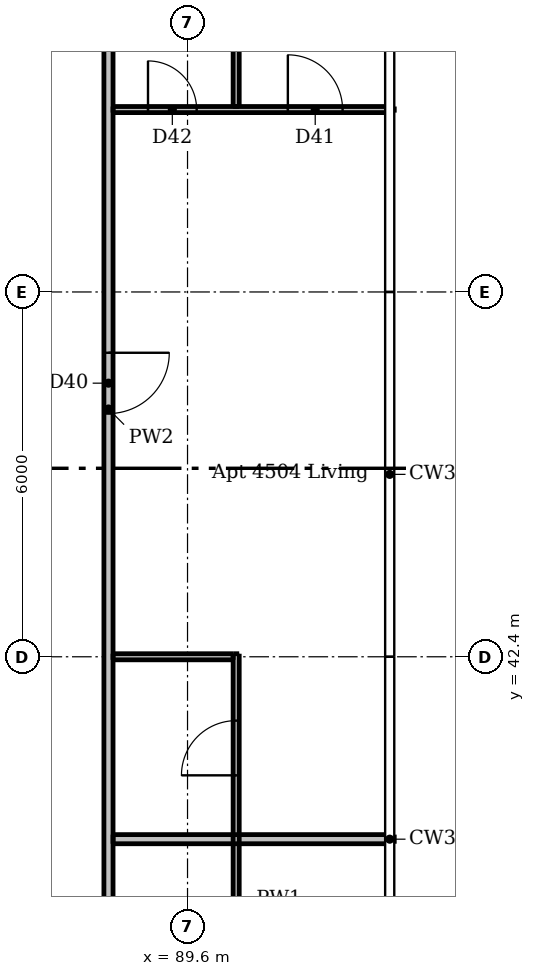
"""IFC4 building model, lengths in metres.
Left out: names, types, materials, properties, quantities, classifications, styles, units other than length and angle.
Written with IfcOpenShell. Run it as: python <this file> out.ifc"""

import sys

from ifc_helpers import new_model, si_unit, direction, frame, frame_2d, origin, place, context, subcontext, project, spatial, rectangle, extrude, element, fill, save


model = new_model("IFC4")
c1 = context("Model", 3, precision=1e-05, world=origin(), true_north=direction((0.0, 1.0)))
c2 = subcontext(c1, "Body", "Model", "MODEL_VIEW")
j1 = project(units=[si_unit("LENGTHUNIT", "METRE"), si_unit("PLANEANGLEUNIT", "RADIAN")], contexts=[c1])
p1 = place(None, origin())
s1 = spatial("IfcSite", under=j1, at=p1, CompositionType="ELEMENT")
p2 = place(p1, origin())
s2 = spatial("IfcBuilding", under=s1, at=p2, CompositionType="ELEMENT")
p3 = place(p2, frame((0.0, 0.0, 168.1)))
s3 = spatial("IfcBuildingStorey", under=s2, at=p3, CompositionType="ELEMENT", Elevation=168.1)
p4 = place(p3, frame((90.4, 33.45, 0.0), z_axis=(0.0, 0.0, 1.0), x_axis=(0.0, 1.0, 0.0)))
e1 = element("IfcWall", 1, at=p4, inside=s3, PredefinedType="PARTITIONING", context=c2, shape_type="SweptSolid", body=[
    extrude(rectangle(XDim=9.0, YDim=0.1, at=frame_2d((4.5, 0.0))), origin(), (0.0, 0.0, 1.0), 3.05),
])
p5 = place(p4, frame((3.75, 0.0, 0.0)))
e2 = element("IfcOpeningElement", 2, at=p5, cuts=e1, PredefinedType="OPENING", context=c2, shape_type="SweptSolid", body=[
    extrude(rectangle(XDim=0.8, YDim=2.1, at=frame_2d((0.4, 1.05))), frame((0.0, 0.06, 0.0), z_axis=(0.0, -1.0, 0.0), x_axis=(1.0, 0.0, 0.0)), (0.0, 0.0, 1.0), 0.12),
])
p6 = place(p4, frame((7.0, 0.0, 0.0)))
e3 = element("IfcOpeningElement", 3, at=p6, cuts=e1, PredefinedType="OPENING", context=c2, shape_type="SweptSolid", body=[
    extrude(rectangle(XDim=0.9, YDim=2.1, at=frame_2d((0.45, 1.05))), frame((0.0, 0.06, 0.0), z_axis=(0.0, -1.0, 0.0), x_axis=(1.0, 0.0, 0.0)), (0.0, 0.0, 1.0), 0.12),
])
p7 = place(p3, frame((90.4, 51.45, 0.0), z_axis=(0.0, 0.0, 1.0), x_axis=(0.0, 1.0, 0.0)))
e4 = element("IfcWall", 4, at=p7, inside=s3, PredefinedType="PARTITIONING", context=c2, shape_type="SweptSolid", body=[
    extrude(rectangle(XDim=5.1, YDim=0.1, at=frame_2d((2.55, 0.0))), origin(), (0.0, 0.0, 1.0), 3.05),
])
p8 = place(p7, frame((3.55, 0.0, 0.0)))
e5 = element("IfcOpeningElement", 5, at=p8, cuts=e4, PredefinedType="OPENING", context=c2, shape_type="SweptSolid", body=[
    extrude(rectangle(XDim=0.9, YDim=2.1, at=frame_2d((0.45, 1.05))), frame((0.0, 0.06, 0.0), z_axis=(0.0, -1.0, 0.0), x_axis=(1.0, 0.0, 0.0)), (0.0, 0.0, 1.0), 0.12),
])
p9 = place(p3, frame((88.375, 51.4, 0.0), z_axis=(0.0, 0.0, 1.0), x_axis=(1.0, 0.0, 0.0)))
e6 = element("IfcWall", 6, at=p9, inside=s3, PredefinedType="PARTITIONING", context=c2, shape_type="SweptSolid", body=[
    extrude(rectangle(XDim=4.625, YDim=0.1, at=frame_2d((2.312, 0.0))), origin(), (0.0, 0.0, 1.0), 3.05),
])
p10 = place(p9, frame((2.875, 0.0, 0.0)))
e7 = element("IfcOpeningElement", 7, at=p10, cuts=e6, PredefinedType="OPENING", context=c2, shape_type="SweptSolid", body=[
    extrude(rectangle(XDim=0.9, YDim=2.1, at=frame_2d((0.45, 1.05))), frame((0.0, 0.06, 0.0), z_axis=(0.0, -1.0, 0.0), x_axis=(1.0, 0.0, 0.0)), (0.0, 0.0, 1.0), 0.12),
])
p11 = place(p9, frame((0.575, 0.0, 0.0)))
e8 = element("IfcOpeningElement", 8, at=p11, cuts=e6, PredefinedType="OPENING", context=c2, shape_type="SweptSolid", body=[
    extrude(rectangle(XDim=0.8, YDim=2.1, at=frame_2d((0.4, 1.05))), frame((0.0, 0.06, 0.0), z_axis=(0.0, -1.0, 0.0), x_axis=(1.0, 0.0, 0.0)), (0.0, 0.0, 1.0), 0.12),
])
p12 = place(p3, frame((88.375, 42.4, 0.0), z_axis=(0.0, 0.0, 1.0), x_axis=(1.0, 0.0, 0.0)))
e9 = element("IfcWall", 9, at=p12, inside=s3, PredefinedType="PARTITIONING", context=c2, shape_type="SweptSolid", body=[
    extrude(rectangle(XDim=1.975, YDim=0.1, at=frame_2d((0.988, 0.0))), origin(), (0.0, 0.0, 1.0), 2.59),
])
p13 = place(p3, frame((88.3, 61.175, 0.0), z_axis=(0.0, 0.0, 1.0), x_axis=(0.0, -1.0, 0.0)))
e10 = element("IfcWall", 10, at=p13, inside=s3, PredefinedType="PARTITIONING", context=c2, shape_type="SweptSolid", body=[
    extrude(rectangle(XDim=29.4, YDim=0.15, at=frame_2d((14.7, 0.0))), origin(), (0.0, 0.0, 1.0), 3.05),
])
p14 = place(p13, frame((28.125, 0.0, 0.0)))
e11 = element("IfcOpeningElement", 11, at=p14, cuts=e10, PredefinedType="OPENING", context=c2, shape_type="SweptSolid", body=[
    extrude(rectangle(XDim=1.0, YDim=2.1, at=frame_2d((0.5, 1.05))), frame((0.0, 0.085, 0.0), z_axis=(0.0, -1.0, 0.0), x_axis=(1.0, 0.0, 0.0)), (0.0, 0.0, 1.0), 0.17),
])
p15 = place(p13, frame((13.775, 0.0, 0.0)))
e12 = element("IfcOpeningElement", 12, at=p15, cuts=e10, PredefinedType="OPENING", context=c2, shape_type="SweptSolid", body=[
    extrude(rectangle(XDim=1.0, YDim=2.1, at=frame_2d((0.5, 1.05))), frame((0.0, 0.085, 0.0), z_axis=(0.0, -1.0, 0.0), x_axis=(1.0, 0.0, 0.0)), (0.0, 0.0, 1.0), 0.17),
])
p16 = place(p13, frame((3.275, 0.0, 0.0)))
e13 = element("IfcOpeningElement", 13, at=p16, cuts=e10, PredefinedType="OPENING", context=c2, shape_type="SweptSolid", body=[
    extrude(rectangle(XDim=1.0, YDim=2.1, at=frame_2d((0.5, 1.05))), frame((0.0, 0.085, 0.0), z_axis=(0.0, -1.0, 0.0), x_axis=(1.0, 0.0, 0.0)), (0.0, 0.0, 1.0), 0.17),
])
p17 = place(p3, frame((88.375, 39.4, 0.0), z_axis=(0.0, 0.0, 1.0), x_axis=(1.0, 0.0, 0.0)))
e14 = element("IfcWall", 14, at=p17, inside=s3, PredefinedType="PARTITIONING", context=c2, shape_type="SweptSolid", body=[
    extrude(rectangle(XDim=4.625, YDim=0.15, at=frame_2d((2.312, 0.0))), origin(), (0.0, 0.0, 1.0), 3.05),
])
p18 = place(p15, origin())
e15 = element("IfcDoor", 15, at=p18, inside=s3, OperationType="SINGLE_SWING_LEFT", PredefinedType="DOOR", context=c2, shape_type="SweptSolid", body=[
    extrude(rectangle(XDim=1.0, YDim=2.1, at=frame_2d((0.5, 1.05))), frame((0.0, 0.025, 0.0), z_axis=(0.0, -1.0, 0.0), x_axis=(1.0, 0.0, 0.0)), (0.0, 0.0, 1.0), 0.05),
])
fill(e12, e15)
p19 = place(p6, origin())
e16 = element("IfcDoor", 16, at=p19, inside=s3, OperationType="SINGLE_SWING_LEFT", PredefinedType="DOOR", context=c2, shape_type="SweptSolid", body=[
    extrude(rectangle(XDim=0.9, YDim=2.1, at=frame_2d((0.45, 1.05))), frame((0.0, 0.025, 0.0), z_axis=(0.0, -1.0, 0.0), x_axis=(1.0, 0.0, 0.0)), (0.0, 0.0, 1.0), 0.05),
])
fill(e3, e16)
p20 = place(p10, origin())
e17 = element("IfcDoor", 17, at=p20, inside=s3, OperationType="SINGLE_SWING_LEFT", PredefinedType="DOOR", context=c2, shape_type="SweptSolid", body=[
    extrude(rectangle(XDim=0.9, YDim=2.1, at=frame_2d((0.45, 1.05))), frame((0.0, 0.025, 0.0), z_axis=(0.0, -1.0, 0.0), x_axis=(1.0, 0.0, 0.0)), (0.0, 0.0, 1.0), 0.05),
])
fill(e7, e17)
p21 = place(p11, origin())
e18 = element("IfcDoor", 18, at=p21, inside=s3, OperationType="SINGLE_SWING_LEFT", PredefinedType="DOOR", context=c2, shape_type="SweptSolid", body=[
    extrude(rectangle(XDim=0.8, YDim=2.1, at=frame_2d((0.4, 1.05))), frame((0.0, 0.025, 0.0), z_axis=(0.0, -1.0, 0.0), x_axis=(1.0, 0.0, 0.0)), (0.0, 0.0, 1.0), 0.05),
])
fill(e8, e18)
save(model, sys.argv[1])
